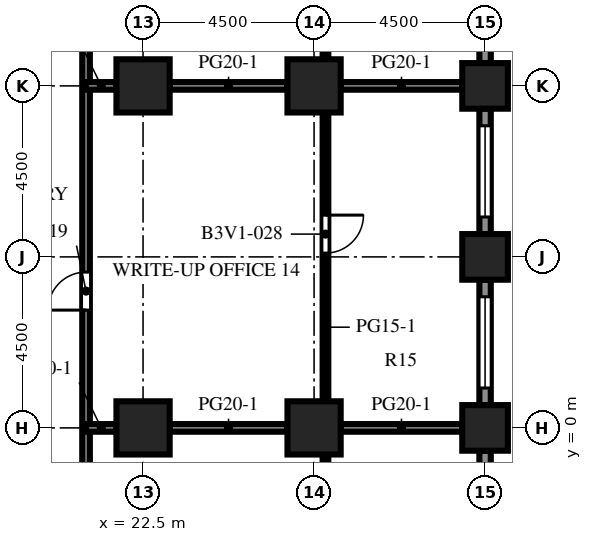
"""IFC4 building model, lengths in metres.
Left out: names, types, materials, properties, quantities, classifications, styles, units other than length and angle.
Written with IfcOpenShell. Run it as: python <this file> out.ifc"""

import sys

from ifc_helpers import new_model, si_unit, direction, frame, frame_2d, origin, origin_2d, place, context, subcontext, project, spatial, rectangle, extrude, element, fill, save


model = new_model("IFC4")
c1 = context("Model", 3, precision=1e-05, world=origin(), true_north=direction((0.0, 1.0)))
c2 = subcontext(c1, "Body", "Model", "MODEL_VIEW")
j1 = project(units=[si_unit("LENGTHUNIT", "METRE"), si_unit("PLANEANGLEUNIT", "RADIAN")], contexts=[c1])
p1 = place(None, origin())
s1 = spatial("IfcSite", under=j1, at=p1, CompositionType="ELEMENT")
p2 = place(p1, origin())
s2 = spatial("IfcBuilding", under=s1, at=p2, CompositionType="ELEMENT")
p3 = place(p2, frame((0.0, 0.0, 94.3)))
s3 = spatial("IfcBuildingStorey", under=s2, at=p3, CompositionType="ELEMENT", Elevation=94.3)
for number, where, z_axis, x_axis in (
    (1, (31.5, 0.0, 0.0), (0.0, 0.0, 1.0), (1.0, 0.0, 0.0)),
    (2, (31.5, 4.5, 0.0), (0.0, 0.0, 1.0), (1.0, 0.0, 0.0)),
    (3, (31.5, 9.0, 0.0), (0.0, 0.0, 1.0), (1.0, 0.0, 0.0)),
):
    element("IfcColumn", number, at=place(p3, frame(where, z_axis=z_axis, x_axis=x_axis)), inside=s3, PredefinedType="COLUMN", context=c2, shape_type="SweptSolid", body=[
        extrude(rectangle(XDim=1.2, YDim=1.2, at=origin_2d()), origin(), (0.0, 0.0, 1.0), 4.1),
    ])
for number, where, z_axis, x_axis in (
    (4, (22.5, 0.0, 0.0), (0.0, 0.0, 1.0), (1.0, 0.0, 0.0)),
    (5, (22.5, 9.0, 0.0), (0.0, 0.0, 1.0), (1.0, 0.0, 0.0)),
    (6, (27.0, 0.0, 0.0), (0.0, 0.0, 1.0), (1.0, 0.0, 0.0)),
    (7, (27.0, 9.0, 0.0), (0.0, 0.0, 1.0), (1.0, 0.0, 0.0)),
):
    element("IfcColumn", number, at=place(p3, frame(where, z_axis=z_axis, x_axis=x_axis)), inside=s3, PredefinedType="COLUMN", context=c2, shape_type="SweptSolid", body=[
        extrude(rectangle(XDim=1.4, YDim=1.4, at=origin_2d()), origin(), (0.0, 0.0, 1.0), 4.1),
    ])
p4 = place(p3, frame((31.5, -0.6, 0.0), z_axis=(0.0, 0.0, 1.0), x_axis=(0.0, -1.0, 0.0)))
e8 = element("IfcWall", 8, at=p4, inside=s3, PredefinedType="SOLIDWALL", context=c2, shape_type="SweptSolid", body=[
    extrude(rectangle(XDim=3.3, YDim=0.3, at=frame_2d((1.65, 0.0))), origin(), (0.0, 0.0, 1.0), 2.75),
])
p5 = place(p4, frame((0.45, 0.0, 0.8)))
e9 = element("IfcOpeningElement", 9, at=p5, cuts=e8, PredefinedType="OPENING", context=c2, shape_type="SweptSolid", body=[
    extrude(rectangle(XDim=2.4, YDim=1.7, at=frame_2d((1.2, 0.85))), frame((0.0, 0.16, 0.0), z_axis=(0.0, -1.0, 0.0), x_axis=(1.0, 0.0, 0.0)), (0.0, 0.0, 1.0), 0.32),
])
p6 = place(p3, frame((31.5, 3.9, 0.0), z_axis=(0.0, 0.0, 1.0), x_axis=(0.0, -1.0, 0.0)))
e10 = element("IfcWall", 10, at=p6, inside=s3, PredefinedType="SOLIDWALL", context=c2, shape_type="SweptSolid", body=[
    extrude(rectangle(XDim=3.3, YDim=0.3, at=frame_2d((1.65, 0.0))), origin(), (0.0, 0.0, 1.0), 2.75),
])
p7 = place(p6, frame((0.45, 0.0, 0.8)))
e11 = element("IfcOpeningElement", 11, at=p7, cuts=e10, PredefinedType="OPENING", context=c2, shape_type="SweptSolid", body=[
    extrude(rectangle(XDim=2.4, YDim=1.7, at=frame_2d((1.2, 0.85))), frame((0.0, 0.16, 0.0), z_axis=(0.0, -1.0, 0.0), x_axis=(1.0, 0.0, 0.0)), (0.0, 0.0, 1.0), 0.32),
])
p8 = place(p3, frame((31.5, 8.4, 0.0), z_axis=(0.0, 0.0, 1.0), x_axis=(0.0, -1.0, 0.0)))
e12 = element("IfcWall", 12, at=p8, inside=s3, PredefinedType="SOLIDWALL", context=c2, shape_type="SweptSolid", body=[
    extrude(rectangle(XDim=3.3, YDim=0.3, at=frame_2d((1.65, 0.0))), origin(), (0.0, 0.0, 1.0), 2.75),
])
p9 = place(p8, frame((0.45, 0.0, 0.8)))
e13 = element("IfcOpeningElement", 13, at=p9, cuts=e12, PredefinedType="OPENING", context=c2, shape_type="SweptSolid", body=[
    extrude(rectangle(XDim=2.4, YDim=1.7, at=frame_2d((1.2, 0.85))), frame((0.0, 0.16, 0.0), z_axis=(0.0, -1.0, 0.0), x_axis=(1.0, 0.0, 0.0)), (0.0, 0.0, 1.0), 0.32),
])
p10 = place(p3, frame((31.5, 12.9, 0.0), z_axis=(0.0, 0.0, 1.0), x_axis=(0.0, -1.0, 0.0)))
e14 = element("IfcWall", 14, at=p10, inside=s3, PredefinedType="SOLIDWALL", context=c2, shape_type="SweptSolid", body=[
    extrude(rectangle(XDim=3.3, YDim=0.3, at=frame_2d((1.65, 0.0))), origin(), (0.0, 0.0, 1.0), 2.75),
])
p11 = place(p10, frame((0.45, 0.0, 0.8)))
e15 = element("IfcOpeningElement", 15, at=p11, cuts=e14, PredefinedType="OPENING", context=c2, shape_type="SweptSolid", body=[
    extrude(rectangle(XDim=2.4, YDim=1.7, at=frame_2d((1.2, 0.85))), frame((0.0, 0.16, 0.0), z_axis=(0.0, -1.0, 0.0), x_axis=(1.0, 0.0, 0.0)), (0.0, 0.0, 1.0), 0.32),
])
p12 = place(p3, frame((21.0, 31.35, 0.0), z_axis=(0.0, 0.0, 1.0), x_axis=(0.0, -1.0, 0.0)))
e16 = element("IfcWall", 16, at=p12, inside=s3, PredefinedType="PARTITIONING", context=c2, shape_type="SweptSolid", body=[
    extrude(rectangle(XDim=53.7, YDim=0.2, at=frame_2d((26.85, 0.0))), origin(), (0.0, 0.0, 1.0), 3.65),
])
p13 = place(p12, frame((47.5, 0.0, 0.0)))
e17 = element("IfcOpeningElement", 17, at=p13, cuts=e16, PredefinedType="OPENING", context=c2, shape_type="SweptSolid", body=[
    extrude(rectangle(XDim=1.0, YDim=2.1, at=frame_2d((0.5, 1.05))), frame((0.0, 0.11, 0.0), z_axis=(0.0, -1.0, 0.0), x_axis=(1.0, 0.0, 0.0)), (0.0, 0.0, 1.0), 0.22),
])
p14 = place(p12, frame((37.5, 0.0, 0.0)))
e18 = element("IfcOpeningElement", 18, at=p14, cuts=e16, PredefinedType="OPENING", context=c2, shape_type="SweptSolid", body=[
    extrude(rectangle(XDim=1.0, YDim=2.1, at=frame_2d((0.5, 1.05))), frame((0.0, 0.11, 0.0), z_axis=(0.0, -1.0, 0.0), x_axis=(1.0, 0.0, 0.0)), (0.0, 0.0, 1.0), 0.22),
])
p15 = place(p12, frame((27.25, 0.0, 0.0)))
e19 = element("IfcOpeningElement", 19, at=p15, cuts=e16, PredefinedType="OPENING", context=c2, shape_type="SweptSolid", body=[
    extrude(rectangle(XDim=1.0, YDim=2.1, at=frame_2d((0.5, 1.05))), frame((0.0, 0.11, 0.0), z_axis=(0.0, -1.0, 0.0), x_axis=(1.0, 0.0, 0.0)), (0.0, 0.0, 1.0), 0.22),
])
p16 = place(p12, frame((17.5, 0.0, 0.0)))
e20 = element("IfcOpeningElement", 20, at=p16, cuts=e16, PredefinedType="OPENING", context=c2, shape_type="SweptSolid", body=[
    extrude(rectangle(XDim=1.0, YDim=2.1, at=frame_2d((0.5, 1.05))), frame((0.0, 0.11, 0.0), z_axis=(0.0, -1.0, 0.0), x_axis=(1.0, 0.0, 0.0)), (0.0, 0.0, 1.0), 0.22),
])
p17 = place(p12, frame((10.75, 0.0, 0.0)))
e21 = element("IfcOpeningElement", 21, at=p17, cuts=e16, PredefinedType="OPENING", context=c2, shape_type="SweptSolid", body=[
    extrude(rectangle(XDim=1.0, YDim=2.1, at=frame_2d((0.5, 1.05))), frame((0.0, 0.11, 0.0), z_axis=(0.0, -1.0, 0.0), x_axis=(1.0, 0.0, 0.0)), (0.0, 0.0, 1.0), 0.22),
])
p18 = place(p12, frame((5.25, 0.0, 0.0)))
e22 = element("IfcOpeningElement", 22, at=p18, cuts=e16, PredefinedType="OPENING", context=c2, shape_type="SweptSolid", body=[
    extrude(rectangle(XDim=1.0, YDim=2.1, at=frame_2d((0.5, 1.05))), frame((0.0, 0.11, 0.0), z_axis=(0.0, -1.0, 0.0), x_axis=(1.0, 0.0, 0.0)), (0.0, 0.0, 1.0), 0.22),
])
p19 = place(p3, frame((27.3, -0.7, 0.0), z_axis=(0.0, 0.0, 1.0), x_axis=(0.0, -1.0, 0.0)))
e23 = element("IfcWall", 23, at=p19, inside=s3, PredefinedType="PARTITIONING", context=c2, shape_type="SweptSolid", body=[
    extrude(rectangle(XDim=7.6, YDim=0.15, at=frame_2d((3.8, 0.0))), origin(), (0.0, 0.0, 1.0), 3.65),
])
p20 = place(p19, frame((5.45, 0.0, 0.0)))
e24 = element("IfcOpeningElement", 24, at=p20, cuts=e23, PredefinedType="OPENING", context=c2, shape_type="SweptSolid", body=[
    extrude(rectangle(XDim=1.0, YDim=2.1, at=frame_2d((0.5, 1.05))), frame((0.0, 0.085, 0.0), z_axis=(0.0, -1.0, 0.0), x_axis=(1.0, 0.0, 0.0)), (0.0, 0.0, 1.0), 0.17),
])
p21 = place(p3, frame((27.3, 8.3, 0.0), z_axis=(0.0, 0.0, 1.0), x_axis=(0.0, -1.0, 0.0)))
e25 = element("IfcWall", 25, at=p21, inside=s3, PredefinedType="PARTITIONING", context=c2, shape_type="SweptSolid", body=[
    extrude(rectangle(XDim=7.6, YDim=0.15, at=frame_2d((3.8, 0.0))), origin(), (0.0, 0.0, 1.0), 3.65),
])
p22 = place(p21, frame((2.7, 0.0, 0.0)))
e26 = element("IfcOpeningElement", 26, at=p22, cuts=e25, PredefinedType="OPENING", context=c2, shape_type="SweptSolid", body=[
    extrude(rectangle(XDim=1.0, YDim=2.1, at=frame_2d((0.5, 1.05))), frame((0.0, 0.085, 0.0), z_axis=(0.0, -1.0, 0.0), x_axis=(1.0, 0.0, 0.0)), (0.0, 0.0, 1.0), 0.17),
])
p23 = place(p3, frame((27.3, 17.3, 0.0), z_axis=(0.0, 0.0, 1.0), x_axis=(0.0, -1.0, 0.0)))
e27 = element("IfcWall", 27, at=p23, inside=s3, PredefinedType="PARTITIONING", context=c2, shape_type="SweptSolid", body=[
    extrude(rectangle(XDim=7.6, YDim=0.15, at=frame_2d((3.8, 0.0))), origin(), (0.0, 0.0, 1.0), 3.65),
])
p24 = place(p23, frame((2.7, 0.0, 0.0)))
e28 = element("IfcOpeningElement", 28, at=p24, cuts=e27, PredefinedType="OPENING", context=c2, shape_type="SweptSolid", body=[
    extrude(rectangle(XDim=1.0, YDim=2.1, at=frame_2d((0.5, 1.05))), frame((0.0, 0.085, 0.0), z_axis=(0.0, -1.0, 0.0), x_axis=(1.0, 0.0, 0.0)), (0.0, 0.0, 1.0), 0.17),
])
p25 = place(p3, frame((21.0, 0.0, 0.0), z_axis=(0.0, 0.0, 1.0), x_axis=(1.0, 0.0, 0.0)))
e29 = element("IfcWall", 29, at=p25, inside=s3, PredefinedType="PARTITIONING", context=c2, shape_type="SweptSolid", body=[
    extrude(rectangle(XDim=0.8, YDim=0.2, at=frame_2d((0.4, 0.0))), origin(), (0.0, 0.0, 1.0), 3.65),
])
p26 = place(p3, frame((23.2, 0.0, 0.0), z_axis=(0.0, 0.0, 1.0), x_axis=(1.0, 0.0, 0.0)))
e30 = element("IfcWall", 30, at=p26, inside=s3, PredefinedType="PARTITIONING", context=c2, shape_type="SweptSolid", body=[
    extrude(rectangle(XDim=3.1, YDim=0.2, at=frame_2d((1.55, 0.0))), origin(), (0.0, 0.0, 1.0), 3.65),
])
p27 = place(p3, frame((27.7, 0.0, 0.0), z_axis=(0.0, 0.0, 1.0), x_axis=(1.0, 0.0, 0.0)))
e31 = element("IfcWall", 31, at=p27, inside=s3, PredefinedType="PARTITIONING", context=c2, shape_type="SweptSolid", body=[
    extrude(rectangle(XDim=3.2, YDim=0.2, at=frame_2d((1.6, 0.0))), origin(), (0.0, 0.0, 1.0), 3.65),
])
p28 = place(p3, frame((21.0, 9.0, 0.0), z_axis=(0.0, 0.0, 1.0), x_axis=(1.0, 0.0, 0.0)))
e32 = element("IfcWall", 32, at=p28, inside=s3, PredefinedType="PARTITIONING", context=c2, shape_type="SweptSolid", body=[
    extrude(rectangle(XDim=0.8, YDim=0.2, at=frame_2d((0.4, 0.0))), origin(), (0.0, 0.0, 1.0), 3.65),
])
p29 = place(p3, frame((23.2, 9.0, 0.0), z_axis=(0.0, 0.0, 1.0), x_axis=(1.0, 0.0, 0.0)))
e33 = element("IfcWall", 33, at=p29, inside=s3, PredefinedType="PARTITIONING", context=c2, shape_type="SweptSolid", body=[
    extrude(rectangle(XDim=3.1, YDim=0.2, at=frame_2d((1.55, 0.0))), origin(), (0.0, 0.0, 1.0), 3.65),
])
p30 = place(p3, frame((27.7, 9.0, 0.0), z_axis=(0.0, 0.0, 1.0), x_axis=(1.0, 0.0, 0.0)))
e34 = element("IfcWall", 34, at=p30, inside=s3, PredefinedType="PARTITIONING", context=c2, shape_type="SweptSolid", body=[
    extrude(rectangle(XDim=3.2, YDim=0.2, at=frame_2d((1.6, 0.0))), origin(), (0.0, 0.0, 1.0), 3.65),
])
p31 = place(p7, origin())
e35 = element("IfcWindow", 35, at=p31, inside=s3, PartitioningType="SINGLE_PANEL", PredefinedType="WINDOW", context=c2, shape_type="SweptSolid", body=[
    extrude(rectangle(XDim=2.4, YDim=1.7, at=frame_2d((1.2, 0.85))), frame((0.0, 0.03, 0.0), z_axis=(0.0, -1.0, 0.0), x_axis=(1.0, 0.0, 0.0)), (0.0, 0.0, 1.0), 0.06),
])
fill(e11, e35)
p32 = place(p9, origin())
e36 = element("IfcWindow", 36, at=p32, inside=s3, PartitioningType="SINGLE_PANEL", PredefinedType="WINDOW", context=c2, shape_type="SweptSolid", body=[
    extrude(rectangle(XDim=2.4, YDim=1.7, at=frame_2d((1.2, 0.85))), frame((0.0, 0.03, 0.0), z_axis=(0.0, -1.0, 0.0), x_axis=(1.0, 0.0, 0.0)), (0.0, 0.0, 1.0), 0.06),
])
fill(e13, e36)
p33 = place(p15, origin())
e37 = element("IfcDoor", 37, at=p33, inside=s3, OperationType="SINGLE_SWING_RIGHT", PredefinedType="DOOR", context=c2, shape_type="SweptSolid", body=[
    extrude(rectangle(XDim=1.0, YDim=2.1, at=frame_2d((0.5, 1.05))), frame((0.0, 0.025, 0.0), z_axis=(0.0, -1.0, 0.0), x_axis=(1.0, 0.0, 0.0)), (0.0, 0.0, 1.0), 0.05),
])
fill(e19, e37)
p34 = place(p22, origin())
e38 = element("IfcDoor", 38, at=p34, inside=s3, OperationType="SINGLE_SWING_LEFT", PredefinedType="DOOR", context=c2, shape_type="SweptSolid", body=[
    extrude(rectangle(XDim=1.0, YDim=2.1, at=frame_2d((0.5, 1.05))), frame((0.0, 0.025, 0.0), z_axis=(0.0, -1.0, 0.0), x_axis=(1.0, 0.0, 0.0)), (0.0, 0.0, 1.0), 0.05),
])
fill(e26, e38)
save(model, sys.argv[1])
